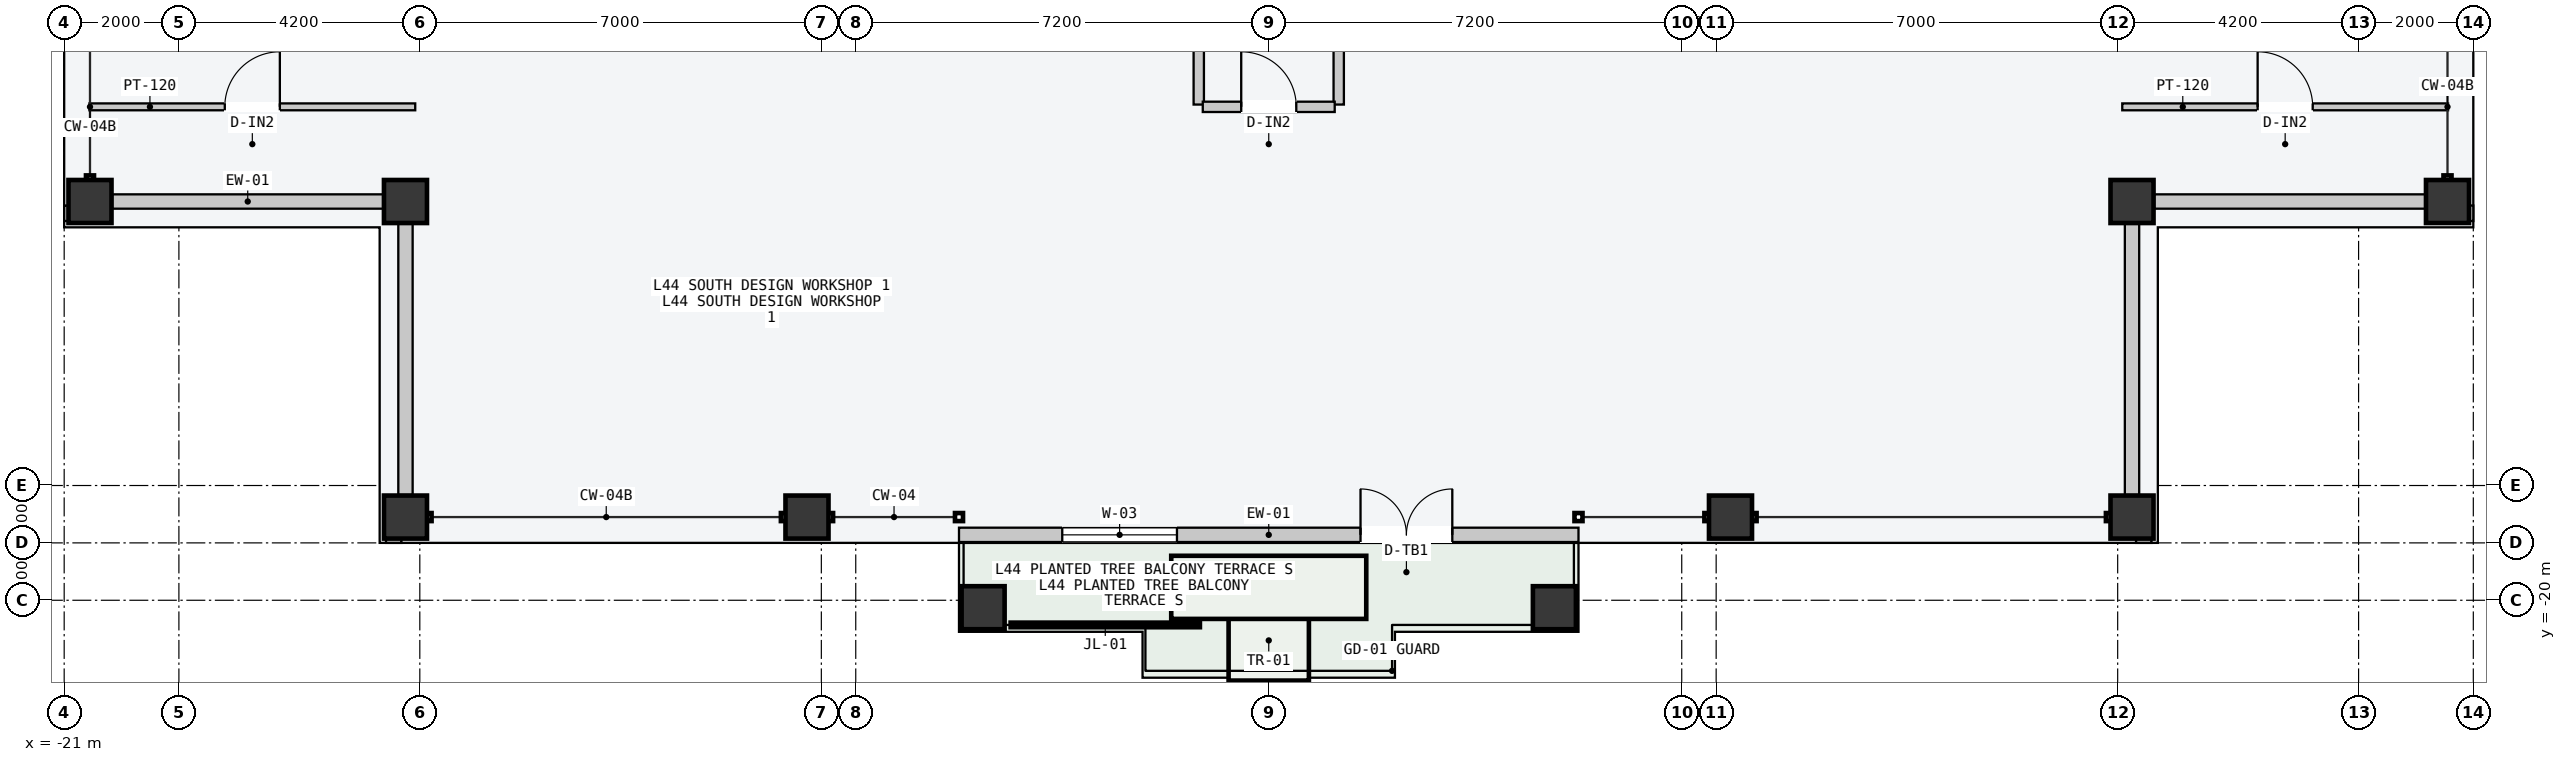
"""IFC4 building model, lengths in metres.
Left out: names, types, materials, properties, quantities, classifications, styles, units other than length and angle.
Written with IfcOpenShell. Run it as: python <this file> out.ifc"""

import sys

from ifc_helpers import new_model, si_unit, direction, frame, frame_2d, origin, origin_2d, place, context, subcontext, project, spatial, rectangle, hollow_rectangle, extrude, element, fill, save


model = new_model("IFC4")
c1 = context("Model", 3, precision=1e-05, world=origin(), true_north=direction((0.0, 1.0)))
c2 = subcontext(c1, "Body", "Model", "MODEL_VIEW")
j1 = project(units=[si_unit("LENGTHUNIT", "METRE"), si_unit("PLANEANGLEUNIT", "RADIAN")], contexts=[c1])
p1 = place(None, origin())
s1 = spatial("IfcSite", under=j1, at=p1, CompositionType="ELEMENT")
p2 = place(p1, origin())
s2 = spatial("IfcBuilding", under=s1, at=p2, CompositionType="ELEMENT")
p3 = place(p2, frame((0.0, 0.0, 169.5)))
s3 = spatial("IfcBuildingStorey", under=s2, at=p3, CompositionType="ELEMENT", Elevation=169.5)
for number, where, z_axis, x_axis in (
    (1, (-15.05, -18.55, 0.0), (0.0, 0.0, 1.0), (1.0, 0.0, 0.0)),
    (2, (-8.05, -18.55, 0.0), (0.0, 0.0, 1.0), (1.0, 0.0, 0.0)),
    (3, (8.05, -18.55, 0.0), (0.0, 0.0, 1.0), (1.0, 0.0, 0.0)),
    (4, (15.05, -18.55, 0.0), (0.0, 0.0, 1.0), (1.0, 0.0, 0.0)),
    (5, (-20.55, -13.05, 0.0), (0.0, 0.0, 1.0), (0.0, 1.0, 0.0)),
    (6, (20.55, -13.05, 0.0), (0.0, 0.0, 1.0), (0.0, 1.0, 0.0)),
    (7, (15.05, -13.05, 0.0), (0.0, 0.0, 1.0), (1.0, 0.0, 0.0)),
    (8, (-15.05, -13.05, 0.0), (0.0, 0.0, 1.0), (1.0, 0.0, 0.0)),
    (9, (-4.98, -20.13, 0.0), (0.0, 0.0, 1.0), (1.0, 0.0, 0.0)),
    (10, (4.98, -20.13, 0.0), (0.0, 0.0, 1.0), (1.0, 0.0, 0.0)),
):
    element("IfcColumn", number, at=place(p3, frame(where, z_axis=z_axis, x_axis=x_axis)), inside=s3, PredefinedType="COLUMN", context=c2, shape_type="SweptSolid", body=[
        extrude(hollow_rectangle(XDim=0.75, YDim=0.75, WallThickness=0.032, at=origin_2d()), origin(), (0.0, 0.0, 1.0), 3.6),
    ])
p4 = place(p3, frame((-5.4, -18.86, 0.0), z_axis=(0.0, 0.0, 1.0), x_axis=(1.0, 0.0, 0.0)))
e11 = element("IfcWall", 11, at=p4, inside=s3, PredefinedType="STANDARD", context=c2, shape_type="SweptSolid", body=[
    extrude(rectangle(XDim=10.8, YDim=0.25, at=frame_2d((5.4, 0.0))), origin(), (0.0, 0.0, 1.0), 3.4),
])
p5 = place(p4, frame((7.0, 0.0, 0.0)))
e12 = element("IfcOpeningElement", 12, at=p5, cuts=e11, PredefinedType="OPENING", context=c2, shape_type="SweptSolid", body=[
    extrude(rectangle(XDim=1.6, YDim=2.2, at=frame_2d((0.8, 1.1))), frame((0.0, 0.135, 0.0), z_axis=(0.0, -1.0, 0.0), x_axis=(1.0, 0.0, 0.0)), (0.0, 0.0, 1.0), 0.27),
])
p6 = place(p4, frame((1.8, 0.0, 0.85)))
e13 = element("IfcOpeningElement", 13, at=p6, cuts=e11, PredefinedType="OPENING", context=c2, shape_type="SweptSolid", body=[
    extrude(rectangle(XDim=2.0, YDim=2.1, at=frame_2d((1.0, 1.05))), frame((0.0, 0.135, 0.0), z_axis=(0.0, -1.0, 0.0), x_axis=(1.0, 0.0, 0.0)), (0.0, 0.0, 1.0), 0.27),
])
for number, where, z_axis, x_axis in (
    (14, (-20.165, -13.05, 0.0), (0.0, 0.0, 1.0), (1.0, 0.0, 0.0)),
    (15, (-15.05, -18.165, 0.0), (0.0, 0.0, 1.0), (0.0, 1.0, 0.0)),
    (16, (15.435, -13.05, 0.0), (0.0, 0.0, 1.0), (1.0, 0.0, 0.0)),
    (17, (15.05, -18.165, 0.0), (0.0, 0.0, 1.0), (0.0, 1.0, 0.0)),
):
    element("IfcWall", number, at=place(p3, frame(where, z_axis=z_axis, x_axis=x_axis)), inside=s3, PredefinedType="STANDARD", context=c2, shape_type="SweptSolid", body=[
        extrude(rectangle(XDim=4.73, YDim=0.25, at=frame_2d((2.365, 0.0))), origin(), (0.0, 0.0, 1.0), 2.75),
    ])
for number, where, z_axis, x_axis in (
    (18, (-15.39, -18.89, 0.0), (0.0, 0.0, 1.0), (1.0, 0.0, 0.0)),
    (19, (-20.89, -13.39, 0.0), (0.0, 0.0, 1.0), (0.0, 1.0, 0.0)),
    (20, (15.12, -18.89, 0.0), (0.0, 0.0, 1.0), (1.0, 0.0, 0.0)),
    (21, (20.89, -13.39, 0.0), (0.0, 0.0, 1.0), (0.0, 1.0, 0.0)),
):
    element("IfcWall", number, at=place(p3, frame(where, z_axis=z_axis, x_axis=x_axis)), inside=s3, PredefinedType="PARAPET", context=c2, shape_type="SweptSolid", body=[
        extrude(rectangle(XDim=0.27, YDim=0.22, at=frame_2d((0.135, 0.0))), origin(), (0.0, 0.0, 1.0), 1.2),
    ])
p7 = place(p3, frame((-1.22, -11.36, 0.0), z_axis=(0.0, 0.0, 1.0), x_axis=(0.0, 1.0, 0.0)))
e22 = element("IfcWall", 22, at=p7, inside=s3, PredefinedType="PARTITIONING", context=c2, shape_type="SweptSolid", body=[
    extrude(rectangle(XDim=5.68, YDim=0.18, at=frame_2d((2.84, 0.0))), origin(), (0.0, 0.0, 1.0), 3.4),
])
p8 = place(p7, frame((1.15, 0.0, 0.0)))
e23 = element("IfcOpeningElement", 23, at=p8, cuts=e22, PredefinedType="OPENING", context=c2, shape_type="SweptSolid", body=[
    extrude(rectangle(XDim=0.96, YDim=2.18, at=frame_2d((0.48, 1.09))), frame((0.0, 0.1, 0.0), z_axis=(0.0, -1.0, 0.0), x_axis=(1.0, 0.0, 0.0)), (0.0, 0.0, 1.0), 0.2),
])
p9 = place(p3, frame((1.22, -11.36, 0.0), z_axis=(0.0, 0.0, 1.0), x_axis=(0.0, 1.0, 0.0)))
e24 = element("IfcWall", 24, at=p9, inside=s3, PredefinedType="PARTITIONING", context=c2, shape_type="SweptSolid", body=[
    extrude(rectangle(XDim=5.68, YDim=0.18, at=frame_2d((2.84, 0.0))), origin(), (0.0, 0.0, 1.0), 3.4),
])
p10 = place(p9, frame((1.15, 0.0, 0.0)))
e25 = element("IfcOpeningElement", 25, at=p10, cuts=e24, PredefinedType="OPENING", context=c2, shape_type="SweptSolid", body=[
    extrude(rectangle(XDim=0.96, YDim=2.18, at=frame_2d((0.48, 1.09))), frame((0.0, 0.1, 0.0), z_axis=(0.0, -1.0, 0.0), x_axis=(1.0, 0.0, 0.0)), (0.0, 0.0, 1.0), 0.2),
])
p11 = place(p3, frame((-1.15, -11.4, 0.0), z_axis=(0.0, 0.0, 1.0), x_axis=(1.0, 0.0, 0.0)))
e26 = element("IfcWall", 26, at=p11, inside=s3, PredefinedType="PARTITIONING", context=c2, shape_type="SweptSolid", body=[
    extrude(rectangle(XDim=2.3, YDim=0.18, at=frame_2d((1.15, 0.0))), origin(), (0.0, 0.0, 1.0), 3.4),
])
p12 = place(p11, frame((0.67, 0.0, 0.0)))
e27 = element("IfcOpeningElement", 27, at=p12, cuts=e26, PredefinedType="OPENING", context=c2, shape_type="SweptSolid", body=[
    extrude(rectangle(XDim=0.96, YDim=2.18, at=frame_2d((0.48, 1.09))), frame((0.0, 0.1, 0.0), z_axis=(0.0, -1.0, 0.0), x_axis=(1.0, 0.0, 0.0)), (0.0, 0.0, 1.0), 0.2),
])
p13 = place(p3, frame((-20.56, -11.4, 0.0), z_axis=(0.0, 0.0, 1.0), x_axis=(1.0, 0.0, 0.0)))
e28 = element("IfcWall", 28, at=p13, inside=s3, PredefinedType="PARTITIONING", context=c2, shape_type="SweptSolid", body=[
    extrude(rectangle(XDim=5.68, YDim=0.12, at=frame_2d((2.84, 0.0))), origin(), (0.0, 0.0, 1.0), 3.4),
])
p14 = place(p13, frame((2.36, 0.0, 0.0)))
e29 = element("IfcOpeningElement", 29, at=p14, cuts=e28, PredefinedType="OPENING", context=c2, shape_type="SweptSolid", body=[
    extrude(rectangle(XDim=0.96, YDim=2.18, at=frame_2d((0.48, 1.09))), frame((0.0, 0.07, 0.0), z_axis=(0.0, -1.0, 0.0), x_axis=(1.0, 0.0, 0.0)), (0.0, 0.0, 1.0), 0.14),
])
p15 = place(p3, frame((14.88, -11.4, 0.0), z_axis=(0.0, 0.0, 1.0), x_axis=(1.0, 0.0, 0.0)))
e30 = element("IfcWall", 30, at=p15, inside=s3, PredefinedType="PARTITIONING", context=c2, shape_type="SweptSolid", body=[
    extrude(rectangle(XDim=5.68, YDim=0.12, at=frame_2d((2.84, 0.0))), origin(), (0.0, 0.0, 1.0), 3.4),
])
p16 = place(p15, frame((2.36, 0.0, 0.0)))
e31 = element("IfcOpeningElement", 31, at=p16, cuts=e30, PredefinedType="OPENING", context=c2, shape_type="SweptSolid", body=[
    extrude(rectangle(XDim=0.96, YDim=2.18, at=frame_2d((0.48, 1.09))), frame((0.0, 0.07, 0.0), z_axis=(0.0, -1.0, 0.0), x_axis=(1.0, 0.0, 0.0)), (0.0, 0.0, 1.0), 0.14),
])
p17 = place(p5, origin())
e32 = element("IfcDoor", 32, at=p17, inside=s3, OperationType="DOUBLE_DOOR_SINGLE_SWING", PredefinedType="DOOR", context=c2, shape_type="SweptSolid", body=[
    extrude(rectangle(XDim=1.6, YDim=2.2, at=frame_2d((0.8, 1.1))), frame((0.0, 0.025, 0.0), z_axis=(0.0, -1.0, 0.0), x_axis=(1.0, 0.0, 0.0)), (0.0, 0.0, 1.0), 0.05),
])
fill(e12, e32)
p18 = place(p6, origin())
e33 = element("IfcWindow", 33, at=p18, inside=s3, PartitioningType="SINGLE_PANEL", PredefinedType="WINDOW", context=c2, shape_type="SweptSolid", body=[
    extrude(rectangle(XDim=2.0, YDim=2.1, at=frame_2d((1.0, 1.05))), frame((0.0, 0.03, 0.0), z_axis=(0.0, -1.0, 0.0), x_axis=(1.0, 0.0, 0.0)), (0.0, 0.0, 1.0), 0.06),
])
fill(e13, e33)
p19 = place(p12, origin())
e34 = element("IfcDoor", 34, at=p19, inside=s3, OperationType="SINGLE_SWING_LEFT", PredefinedType="DOOR", context=c2, shape_type="SweptSolid", body=[
    extrude(rectangle(XDim=0.96, YDim=2.18, at=frame_2d((0.48, 1.09))), frame((0.0, 0.025, 0.0), z_axis=(0.0, -1.0, 0.0), x_axis=(1.0, 0.0, 0.0)), (0.0, 0.0, 1.0), 0.05),
])
fill(e27, e34)
p20 = place(p14, origin())
e35 = element("IfcDoor", 35, at=p20, inside=s3, OperationType="SINGLE_SWING_RIGHT", PredefinedType="DOOR", context=c2, shape_type="SweptSolid", body=[
    extrude(rectangle(XDim=0.96, YDim=2.18, at=frame_2d((0.48, 1.09))), frame((0.0, 0.025, 0.0), z_axis=(0.0, -1.0, 0.0), x_axis=(1.0, 0.0, 0.0)), (0.0, 0.0, 1.0), 0.05),
])
fill(e29, e35)
p21 = place(p16, origin())
e36 = element("IfcDoor", 36, at=p21, inside=s3, OperationType="SINGLE_SWING_LEFT", PredefinedType="DOOR", context=c2, shape_type="SweptSolid", body=[
    extrude(rectangle(XDim=0.96, YDim=2.18, at=frame_2d((0.48, 1.09))), frame((0.0, 0.025, 0.0), z_axis=(0.0, -1.0, 0.0), x_axis=(1.0, 0.0, 0.0)), (0.0, 0.0, 1.0), 0.05),
])
fill(e31, e36)
save(model, sys.argv[1])
